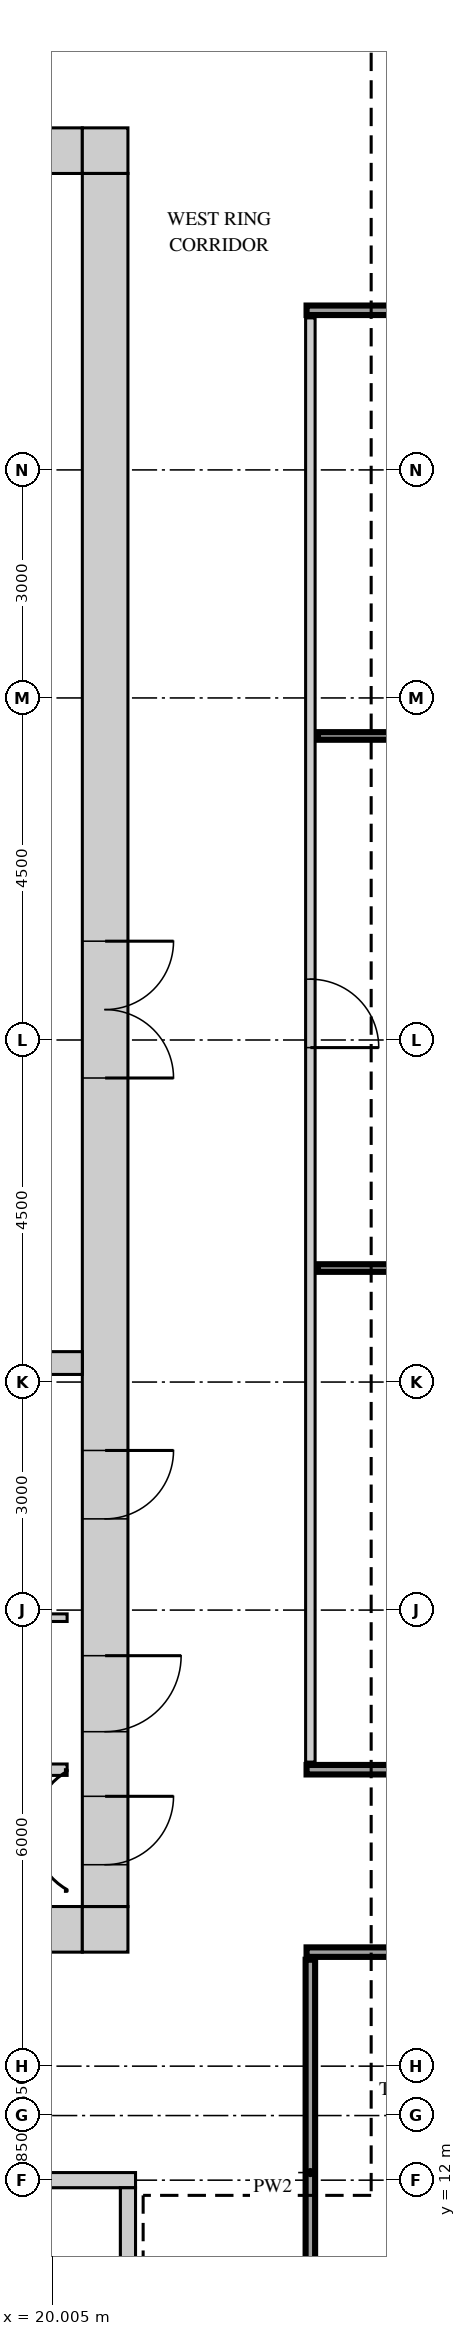
"""IFC4 building model, lengths in metres.
Left out: names, types, materials, properties, quantities, classifications, styles, units other than length and angle.
Written with IfcOpenShell. Run it as: python <this file> out.ifc"""

import sys

from ifc_helpers import new_model, si_unit, direction, frame, frame_2d, origin, place, context, subcontext, project, spatial, rectangle, extrude, source, transform, mapped, element, fill, save


model = new_model("IFC4")
c1 = context("Model", 3, precision=1e-05, world=origin(), true_north=direction((0.0, 1.0)))
c2 = subcontext(c1, "Body", "Model", "MODEL_VIEW")
j1 = project(units=[si_unit("LENGTHUNIT", "METRE"), si_unit("PLANEANGLEUNIT", "RADIAN")], contexts=[c1])
p1 = place(None, origin())
s1 = spatial("IfcSite", under=j1, at=p1, CompositionType="ELEMENT")
p2 = place(p1, origin())
s2 = spatial("IfcBuilding", under=s1, at=p2, CompositionType="ELEMENT")
p3 = place(p2, frame((0.0, 0.0, 282.2)))
s3 = spatial("IfcBuildingStorey", under=s2, at=p3, CompositionType="ELEMENT", Elevation=282.2)
m1 = source(origin(), c2, "Body", "SweptSolid", [
    extrude(rectangle(XDim=14.4, YDim=0.6, at=frame_2d((7.2, 0.0))), origin(), (0.0, 0.0, 1.0), 3.75),
])
p4 = place(p3, frame((6.0, 38.7, 0.0), z_axis=(0.0, 0.0, 1.0), x_axis=(1.0, 0.0, 0.0)))
e1 = element("IfcWall", 1, at=p4, inside=s3, PredefinedType="SHEAR", context=c2, shape_type="MappedRepresentation", body=[
    mapped(m1, transform((0.0, 0.0, 0.0))),
])
m2 = source(origin(), c2, "Body", "SweptSolid", [
    extrude(rectangle(XDim=0.9, YDim=2.1, at=frame_2d((0.45, 1.05))), frame((0.0, 0.31, 0.0), z_axis=(0.0, -1.0, 0.0), x_axis=(1.0, 0.0, 0.0)), (0.0, 0.0, 1.0), 0.62),
])
p5 = place(p4, frame((2.55, 0.0, 0.0)))
e2 = element("IfcOpeningElement", 2, at=p5, cuts=e1, PredefinedType="OPENING", context=c2, shape_type="MappedRepresentation", body=[
    mapped(m2, transform((0.0, 0.0, 0.0))),
])
p6 = place(p4, frame((7.0, 0.0, 0.0)))
e3 = element("IfcOpeningElement", 3, at=p6, cuts=e1, PredefinedType="OPENING", context=c2, shape_type="MappedRepresentation", body=[
    mapped(m2, transform((0.0, 0.0, 0.0))),
])
p7 = place(p4, frame((11.5, 0.0, 0.0)))
e4 = element("IfcOpeningElement", 4, at=p7, cuts=e1, PredefinedType="OPENING", context=c2, shape_type="MappedRepresentation", body=[
    mapped(m2, transform((0.0, 0.0, 0.0))),
])
m3 = source(origin(), c2, "Body", "SweptSolid", [
    extrude(rectangle(XDim=0.6, YDim=0.6, at=frame_2d((0.3, 0.0))), origin(), (0.0, 0.0, 1.0), 3.75),
])
p8 = place(p3, frame((20.4, 38.7, 0.0), z_axis=(0.0, 0.0, 1.0), x_axis=(1.0, 0.0, 0.0)))
e5 = element("IfcWall", 5, at=p8, inside=s3, PredefinedType="SHEAR", context=c2, shape_type="MappedRepresentation", body=[
    mapped(m3, transform((0.0, 0.0, 0.0))),
])
p9 = place(p3, frame((6.0, 15.3, 0.0), z_axis=(0.0, 0.0, 1.0), x_axis=(1.0, 0.0, 0.0)))
e6 = element("IfcWall", 6, at=p9, inside=s3, PredefinedType="SHEAR", context=c2, shape_type="MappedRepresentation", body=[
    mapped(m1, transform((0.0, 0.0, 0.0))),
])
m4 = source(origin(), c2, "Body", "SweptSolid", [
    extrude(rectangle(XDim=1.2, YDim=2.1, at=frame_2d((0.6, 1.05))), frame((0.0, 0.31, 0.0), z_axis=(0.0, -1.0, 0.0), x_axis=(1.0, 0.0, 0.0)), (0.0, 0.0, 1.0), 0.62),
])
p10 = place(p9, frame((6.2, 0.0, 0.0)))
e7 = element("IfcOpeningElement", 7, at=p10, cuts=e6, PredefinedType="OPENING", context=c2, shape_type="MappedRepresentation", body=[
    mapped(m4, transform((0.0, 0.0, 0.0))),
])
p11 = place(p9, frame((2.85, 0.0, 0.0)))
e8 = element("IfcOpeningElement", 8, at=p11, cuts=e6, PredefinedType="OPENING", context=c2, shape_type="MappedRepresentation", body=[
    mapped(m4, transform((0.0, 0.0, 0.0))),
])
m5 = source(origin(), c2, "Body", "SweptSolid", [
    extrude(rectangle(XDim=1.0, YDim=2.1, at=frame_2d((0.5, 1.05))), frame((0.0, 0.31, 0.0), z_axis=(0.0, -1.0, 0.0), x_axis=(1.0, 0.0, 0.0)), (0.0, 0.0, 1.0), 0.62),
])
p12 = place(p9, frame((8.7, 0.0, 0.0)))
e9 = element("IfcOpeningElement", 9, at=p12, cuts=e6, PredefinedType="OPENING", context=c2, shape_type="MappedRepresentation", body=[
    mapped(m5, transform((0.0, 0.0, 0.0))),
])
p13 = place(p3, frame((20.4, 15.3, 0.0), z_axis=(0.0, 0.0, 1.0), x_axis=(1.0, 0.0, 0.0)))
e10 = element("IfcWall", 10, at=p13, inside=s3, PredefinedType="SHEAR", context=c2, shape_type="MappedRepresentation", body=[
    mapped(m3, transform((0.0, 0.0, 0.0))),
])
m6 = source(origin(), c2, "Body", "SweptSolid", [
    extrude(rectangle(XDim=22.8, YDim=0.6, at=frame_2d((11.4, 0.0))), origin(), (0.0, 0.0, 1.0), 3.75),
])
p14 = place(p3, frame((20.7, 15.6, 0.0), z_axis=(0.0, 0.0, 1.0), x_axis=(0.0, 1.0, 0.0)))
e11 = element("IfcWall", 11, at=p14, inside=s3, PredefinedType="SHEAR", context=c2, shape_type="MappedRepresentation", body=[
    mapped(m6, transform((0.0, 0.0, 0.0))),
])
m7 = source(origin(), c2, "Body", "SweptSolid", [
    extrude(rectangle(XDim=1.8, YDim=2.1, at=frame_2d((0.9, 1.05))), frame((0.0, 0.31, 0.0), z_axis=(0.0, -1.0, 0.0), x_axis=(1.0, 0.0, 0.0)), (0.0, 0.0, 1.0), 0.62),
])
p15 = place(p14, frame((10.9, 0.0, 0.0)))
e12 = element("IfcOpeningElement", 12, at=p15, cuts=e11, PredefinedType="OPENING", context=c2, shape_type="MappedRepresentation", body=[
    mapped(m7, transform((0.0, 0.0, 0.0))),
])
p16 = place(p14, frame((0.55, 0.0, 0.0)))
e13 = element("IfcOpeningElement", 13, at=p16, cuts=e11, PredefinedType="OPENING", context=c2, shape_type="MappedRepresentation", body=[
    mapped(m2, transform((0.0, 0.0, 0.0))),
])
p17 = place(p14, frame((2.3, 0.0, 0.0)))
e14 = element("IfcOpeningElement", 14, at=p17, cuts=e11, PredefinedType="OPENING", context=c2, shape_type="MappedRepresentation", body=[
    mapped(m5, transform((0.0, 0.0, 0.0))),
])
p18 = place(p14, frame((5.1, 0.0, 0.0)))
e15 = element("IfcOpeningElement", 15, at=p18, cuts=e11, PredefinedType="OPENING", context=c2, shape_type="MappedRepresentation", body=[
    mapped(m2, transform((0.0, 0.0, 0.0))),
])
m8 = source(origin(), c2, "Body", "SweptSolid", [
    extrude(rectangle(XDim=7.2, YDim=0.2, at=frame_2d((3.6, 0.0))), origin(), (0.0, 0.0, 1.0), 3.75),
])
p19 = place(p3, frame((13.9, 12.0, 0.0), z_axis=(0.0, 0.0, 1.0), x_axis=(1.0, 0.0, 0.0)))
e16 = element("IfcWall", 16, at=p19, inside=s3, PredefinedType="SHEAR", context=c2, shape_type="MappedRepresentation", body=[
    mapped(m8, transform((0.0, 0.0, 0.0))),
])
m9 = source(origin(), c2, "Body", "SweptSolid", [
    extrude(rectangle(XDim=3.35, YDim=0.2, at=frame_2d((1.675, 0.0))), origin(), (0.0, 0.0, 1.0), 3.75),
])
p20 = place(p3, frame((21.0, 8.55, 0.0), z_axis=(0.0, 0.0, 1.0), x_axis=(0.0, 1.0, 0.0)))
e17 = element("IfcWall", 17, at=p20, inside=s3, PredefinedType="SHEAR", context=c2, shape_type="MappedRepresentation", body=[
    mapped(m9, transform((0.0, 0.0, 0.0))),
])
m10 = source(origin(), c2, "Body", "SweptSolid", [
    extrude(rectangle(XDim=13.2, YDim=0.3, at=frame_2d((6.6, 0.0))), origin(), (0.0, 0.0, 1.0), 3.75),
])
p21 = place(p3, frame((7.2, 22.75, 0.0), z_axis=(0.0, 0.0, 1.0), x_axis=(1.0, 0.0, 0.0)))
e18 = element("IfcWall", 18, at=p21, inside=s3, PredefinedType="STANDARD", context=c2, shape_type="MappedRepresentation", body=[
    mapped(m10, transform((0.0, 0.0, 0.0))),
])
m11 = source(origin(), c2, "Body", "SweptSolid", [
    extrude(rectangle(XDim=8.75, YDim=0.125, at=frame_2d((4.375, 0.0))), origin(), (0.0, 0.0, 1.0), 3.8),
])
p22 = place(p3, frame((23.4, 6.15, 0.0), z_axis=(0.0, 0.0, 1.0), x_axis=(0.0, 1.0, 0.0)))
e19 = element("IfcWall", 19, at=p22, inside=s3, PredefinedType="PARTITIONING", context=c2, shape_type="MappedRepresentation", body=[
    mapped(m11, transform((0.0, 0.0, 0.0))),
])
m12 = source(origin(), c2, "Body", "SweptSolid", [
    extrude(rectangle(XDim=0.9, YDim=2.1, at=frame_2d((0.45, 1.05))), frame((0.0, 0.073, 0.0), z_axis=(0.0, -1.0, 0.0), x_axis=(1.0, 0.0, 0.0)), (0.0, 0.0, 1.0), 0.145),
])
p23 = place(p22, frame((2.25, 0.0, 0.0)))
e20 = element("IfcOpeningElement", 20, at=p23, cuts=e19, PredefinedType="OPENING", context=c2, shape_type="MappedRepresentation", body=[
    mapped(m12, transform((0.0, 0.0, 0.0))),
])
m13 = source(origin(), c2, "Body", "SweptSolid", [
    extrude(rectangle(XDim=19.1, YDim=0.125, at=frame_2d((9.55, 0.0))), origin(), (0.0, 0.0, 1.0), 3.8),
])
p24 = place(p3, frame((23.35, 15.0, 0.0), z_axis=(0.0, 0.0, 1.0), x_axis=(1.0, 0.0, 0.0)))
e21 = element("IfcWall", 21, at=p24, inside=s3, PredefinedType="PARTITIONING", context=c2, shape_type="MappedRepresentation", body=[
    mapped(m13, transform((0.0, 0.0, 0.0))),
])
p25 = place(p24, frame((7.1, 0.0, 0.0)))
e22 = element("IfcOpeningElement", 22, at=p25, cuts=e21, PredefinedType="OPENING", context=c2, shape_type="MappedRepresentation", body=[
    mapped(m12, transform((0.0, 0.0, 0.0))),
])
p26 = place(p24, frame((13.3, 0.0, 0.0)))
e23 = element("IfcOpeningElement", 23, at=p26, cuts=e21, PredefinedType="OPENING", context=c2, shape_type="MappedRepresentation", body=[
    mapped(m12, transform((0.0, 0.0, 0.0))),
])
m14 = source(origin(), c2, "Body", "SweptSolid", [
    extrude(rectangle(XDim=4.0, YDim=0.15, at=frame_2d((2.0, 0.0))), origin(), (0.0, 0.0, 1.0), 3.8),
])
p27 = place(p3, frame((16.2, 17.4, 0.0), z_axis=(0.0, 0.0, 1.0), x_axis=(1.0, 0.0, 0.0)))
e24 = element("IfcWall", 24, at=p27, inside=s3, PredefinedType="PARTITIONING", context=c2, shape_type="MappedRepresentation", body=[
    mapped(m14, transform((0.0, 0.0, 0.0))),
])
m15 = source(origin(), c2, "Body", "SweptSolid", [
    extrude(rectangle(XDim=16.7, YDim=0.125, at=frame_2d((8.35, 0.0))), origin(), (0.0, 0.0, 1.0), 3.8),
])
p28 = place(p3, frame((23.35, 17.4, 0.0), z_axis=(0.0, 0.0, 1.0), x_axis=(1.0, 0.0, 0.0)))
e25 = element("IfcWall", 25, at=p28, inside=s3, PredefinedType="PARTITIONING", context=c2, shape_type="MappedRepresentation", body=[
    mapped(m15, transform((0.0, 0.0, 0.0))),
])
p29 = place(p28, frame((8.05, 0.0, 0.0)))
e26 = element("IfcOpeningElement", 26, at=p29, cuts=e25, PredefinedType="OPENING", context=c2, shape_type="MappedRepresentation", body=[
    mapped(m12, transform((0.0, 0.0, 0.0))),
])
m16 = source(origin(), c2, "Body", "SweptSolid", [
    extrude(rectangle(XDim=19.0, YDim=0.125, at=frame_2d((9.5, 0.0))), origin(), (0.0, 0.0, 1.0), 3.8),
])
p30 = place(p3, frame((23.4, 17.5, 0.0), z_axis=(0.0, 0.0, 1.0), x_axis=(0.0, 1.0, 0.0)))
e27 = element("IfcWall", 27, at=p30, inside=s3, PredefinedType="PARTITIONING", context=c2, shape_type="MappedRepresentation", body=[
    mapped(m16, transform((0.0, 0.0, 0.0))),
])
p31 = place(p30, frame((9.4, 0.0, 0.0)))
e28 = element("IfcOpeningElement", 28, at=p31, cuts=e27, PredefinedType="OPENING", context=c2, shape_type="MappedRepresentation", body=[
    mapped(m12, transform((0.0, 0.0, 0.0))),
])
m17 = source(origin(), c2, "Body", "SweptSolid", [
    extrude(rectangle(XDim=4.1, YDim=0.1, at=frame_2d((2.05, 0.0))), origin(), (0.0, 0.0, 1.0), 3.8),
])
p32 = place(p3, frame((16.1, 19.4, 0.0), z_axis=(0.0, 0.0, 1.0), x_axis=(1.0, 0.0, 0.0)))
e29 = element("IfcWall", 29, at=p32, inside=s3, PredefinedType="PARTITIONING", context=c2, shape_type="MappedRepresentation", body=[
    mapped(m17, transform((0.0, 0.0, 0.0))),
])
m18 = source(origin(), c2, "Body", "SweptSolid", [
    extrude(rectangle(XDim=16.4, YDim=0.1, at=frame_2d((8.2, 0.0))), origin(), (0.0, 0.0, 1.0), 3.8),
])
for number, where, z_axis, x_axis in (
    (30, (23.5, 24.0, 0.0), (0.0, 0.0, 1.0), (1.0, 0.0, 0.0)),
    (31, (23.5, 31.0, 0.0), (0.0, 0.0, 1.0), (1.0, 0.0, 0.0)),
):
    element("IfcWall", number, at=place(p3, frame(where, z_axis=z_axis, x_axis=x_axis)), inside=s3, PredefinedType="PARTITIONING", context=c2, shape_type="MappedRepresentation", body=[
        mapped(m18, transform((0.0, 0.0, 0.0))),
    ])
p33 = place(p3, frame((23.35, 36.6, 0.0), z_axis=(0.0, 0.0, 1.0), x_axis=(1.0, 0.0, 0.0)))
e32 = element("IfcWall", 32, at=p33, inside=s3, PredefinedType="PARTITIONING", context=c2, shape_type="MappedRepresentation", body=[
    mapped(m15, transform((0.0, 0.0, 0.0))),
])
p34 = place(p33, frame((8.05, 0.0, 0.0)))
e33 = element("IfcOpeningElement", 33, at=p34, cuts=e32, PredefinedType="OPENING", context=c2, shape_type="MappedRepresentation", body=[
    mapped(m12, transform((0.0, 0.0, 0.0))),
])
m19 = source(origin(), c2, "Body", "SweptSolid", [
    extrude(rectangle(XDim=1.8, YDim=2.1, at=frame_2d((0.9, 1.05))), frame((0.0, 0.25, 0.0), z_axis=(0.0, -1.0, 0.0), x_axis=(1.0, 0.0, 0.0)), (0.0, 0.0, 1.0), 0.5),
])
p35 = place(p15, origin())
e34 = element("IfcDoor", 34, at=p35, inside=s3, OperationType="DOUBLE_DOOR_SINGLE_SWING", PredefinedType="DOOR", context=c2, shape_type="MappedRepresentation", body=[
    mapped(m19, transform((0.0, 0.0, 0.0))),
])
fill(e12, e34)
m20 = source(origin(), c2, "Body", "SweptSolid", [
    extrude(rectangle(XDim=0.9, YDim=2.1, at=frame_2d((0.45, 1.05))), frame((0.0, 0.25, 0.0), z_axis=(0.0, -1.0, 0.0), x_axis=(1.0, 0.0, 0.0)), (0.0, 0.0, 1.0), 0.5),
])
p36 = place(p16, origin())
e35 = element("IfcDoor", 35, at=p36, inside=s3, OperationType="SINGLE_SWING_RIGHT", PredefinedType="DOOR", context=c2, shape_type="MappedRepresentation", body=[
    mapped(m20, transform((0.0, 0.0, 0.0))),
])
fill(e13, e35)
m21 = source(origin(), c2, "Body", "SweptSolid", [
    extrude(rectangle(XDim=1.0, YDim=2.1, at=frame_2d((0.5, 1.05))), frame((0.0, 0.25, 0.0), z_axis=(0.0, -1.0, 0.0), x_axis=(1.0, 0.0, 0.0)), (0.0, 0.0, 1.0), 0.5),
])
p37 = place(p17, origin())
e36 = element("IfcDoor", 36, at=p37, inside=s3, OperationType="SINGLE_SWING_RIGHT", PredefinedType="DOOR", context=c2, shape_type="MappedRepresentation", body=[
    mapped(m21, transform((0.0, 0.0, 0.0))),
])
fill(e14, e36)
p38 = place(p18, origin())
e37 = element("IfcDoor", 37, at=p38, inside=s3, OperationType="SINGLE_SWING_RIGHT", PredefinedType="DOOR", context=c2, shape_type="MappedRepresentation", body=[
    mapped(m20, transform((0.0, 0.0, 0.0))),
])
fill(e15, e37)
m22 = source(origin(), c2, "Body", "SweptSolid", [
    extrude(rectangle(XDim=0.9, YDim=2.1, at=frame_2d((0.45, 1.05))), frame((0.0, 0.025, 0.0), z_axis=(0.0, -1.0, 0.0), x_axis=(1.0, 0.0, 0.0)), (0.0, 0.0, 1.0), 0.05),
])
p39 = place(p31, origin())
e38 = element("IfcDoor", 38, at=p39, inside=s3, OperationType="SINGLE_SWING_LEFT", PredefinedType="DOOR", context=c2, shape_type="MappedRepresentation", body=[
    mapped(m22, transform((0.0, 0.0, 0.0))),
])
fill(e28, e38)
save(model, sys.argv[1])
